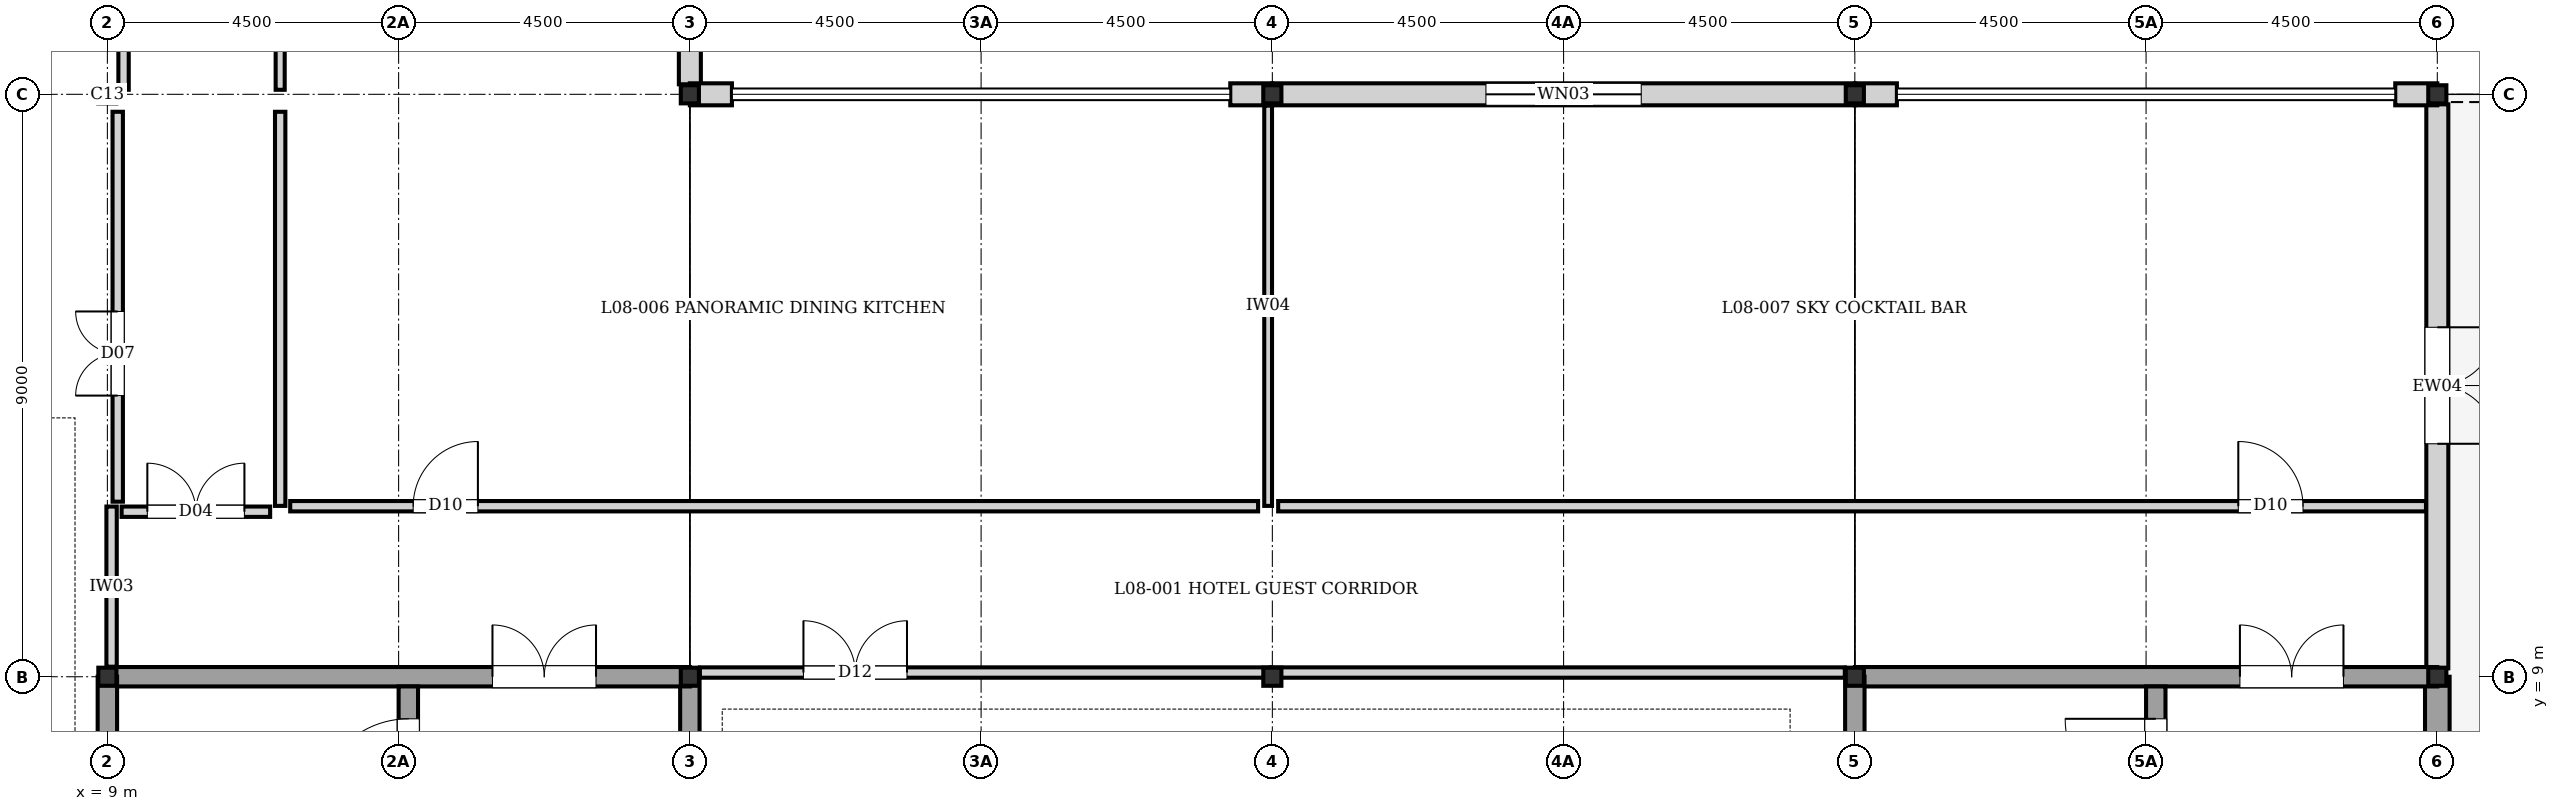
"""IFC4 building model, lengths in metres.
Left out: names, types, materials, properties, quantities, classifications, styles, units other than length and angle.
Written with IfcOpenShell. Run it as: python <this file> out.ifc"""

import sys

from ifc_helpers import new_model, si_unit, direction, frame, frame_2d, origin, origin_2d, place, context, subcontext, project, spatial, rectangle, i_section, extrude, element, fill, save


model = new_model("IFC4")
c1 = context("Model", 3, precision=1e-05, world=origin(), true_north=direction((0.0, 1.0)))
c2 = subcontext(c1, "Body", "Model", "MODEL_VIEW")
j1 = project(units=[si_unit("LENGTHUNIT", "METRE"), si_unit("PLANEANGLEUNIT", "RADIAN")], contexts=[c1])
p1 = place(None, origin())
s1 = spatial("IfcSite", under=j1, at=p1, CompositionType="ELEMENT")
p2 = place(p1, origin())
s2 = spatial("IfcBuilding", under=s1, at=p2, CompositionType="ELEMENT")
p3 = place(p2, frame((0.0, 0.0, 26.88)))
s3 = spatial("IfcBuildingStorey", under=s2, at=p3, CompositionType="ELEMENT", Elevation=26.88)
for number, where, z_axis, x_axis in (
    (1, (9.0, 9.0, 0.0), (0.0, 0.0, 1.0), (1.0, 0.0, 0.0)),
    (2, (9.0, 18.0, 0.0), (0.0, 0.0, 1.0), (1.0, 0.0, 0.0)),
    (3, (18.0, 9.0, 0.0), (0.0, 0.0, 1.0), (1.0, 0.0, 0.0)),
    (4, (18.0, 18.0, 0.0), (0.0, 0.0, 1.0), (1.0, 0.0, 0.0)),
    (5, (27.0, 9.0, 0.0), (0.0, 0.0, 1.0), (1.0, 0.0, 0.0)),
    (6, (27.0, 18.0, 0.0), (0.0, 0.0, 1.0), (1.0, 0.0, 0.0)),
    (7, (36.0, 9.0, 0.0), (0.0, 0.0, 1.0), (1.0, 0.0, 0.0)),
    (8, (36.0, 18.0, 0.0), (0.0, 0.0, 1.0), (1.0, 0.0, 0.0)),
    (9, (45.0, 9.0, 0.0), (0.0, 0.0, 1.0), (1.0, 0.0, 0.0)),
    (10, (45.0, 18.0, 0.0), (0.0, 0.0, 1.0), (1.0, 0.0, 0.0)),
):
    element("IfcColumn", number, at=place(p3, frame(where, z_axis=z_axis, x_axis=x_axis)), inside=s3, PredefinedType="COLUMN", context=c2, shape_type="SweptSolid", body=[
        extrude(i_section(OverallWidth=0.28, OverallDepth=0.28, WebThickness=0.01, FlangeThickness=0.018, at=origin_2d()), origin(), (0.0, 0.0, 1.0), 3.52),
    ])
p4 = place(p3, frame((45.0, 17.845, 0.0), z_axis=(0.0, 0.0, 1.0), x_axis=(0.0, -1.0, 0.0)))
e11 = element("IfcWall", 11, at=p4, inside=s3, PredefinedType="SOLIDWALL", context=c2, shape_type="SweptSolid", body=[
    extrude(rectangle(XDim=8.715, YDim=0.34, at=frame_2d((4.357, 0.0))), origin(), (0.0, 0.0, 1.0), 2.88),
])
p5 = place(p4, frame((3.445, 0.0, 0.0)))
e12 = element("IfcOpeningElement", 12, at=p5, cuts=e11, PredefinedType="OPENING", context=c2, shape_type="SweptSolid", body=[
    extrude(rectangle(XDim=1.8, YDim=2.3, at=frame_2d((0.9, 1.15))), frame((0.0, 0.18, 0.0), z_axis=(0.0, -1.0, 0.0), x_axis=(1.0, 0.0, 0.0)), (0.0, 0.0, 1.0), 0.36),
])
p6 = place(p3, frame((45.0, 9.0, 0.0), z_axis=(0.0, 0.0, 1.0), x_axis=(0.0, -1.0, 0.0)))
e13 = element("IfcWall", 13, at=p6, inside=s3, PredefinedType="SOLIDWALL", context=c2, shape_type="SweptSolid", body=[
    extrude(rectangle(XDim=9.0, YDim=0.38, at=frame_2d((4.5, 0.0))), origin(), (0.0, 0.0, 1.0), 3.27),
])
p7 = place(p3, frame((18.0, 27.0, 0.0), z_axis=(0.0, 0.0, 1.0), x_axis=(0.0, -1.0, 0.0)))
e14 = element("IfcWall", 14, at=p7, inside=s3, PredefinedType="SOLIDWALL", context=c2, shape_type="SweptSolid", body=[
    extrude(rectangle(XDim=8.845, YDim=0.34, at=frame_2d((4.422, 0.0))), origin(), (0.0, 0.0, 1.0), 2.97),
])
p8 = place(p7, frame((4.0, 0.0, 0.4)))
e15 = element("IfcOpeningElement", 15, at=p8, cuts=e14, PredefinedType="OPENING", context=c2, shape_type="SweptSolid", body=[
    extrude(rectangle(XDim=1.0, YDim=1.6, at=frame_2d((0.5, 0.8))), frame((0.0, 0.18, 0.0), z_axis=(0.0, -1.0, 0.0), x_axis=(1.0, 0.0, 0.0)), (0.0, 0.0, 1.0), 0.36),
])
for number, where, z_axis, x_axis in (
    (16, (18.0, 18.0, 0.0), (0.0, 0.0, 1.0), (1.0, 0.0, 0.0)),
    (17, (26.35, 18.0, 0.0), (0.0, 0.0, 1.0), (1.0, 0.0, 0.0)),
):
    element("IfcWall", number, at=place(p3, frame(where, z_axis=z_axis, x_axis=x_axis)), inside=s3, PredefinedType="SOLIDWALL", context=c2, shape_type="SweptSolid", body=[
        extrude(rectangle(XDim=0.65, YDim=0.34, at=frame_2d((0.325, 0.0))), origin(), (0.0, 0.0, 1.0), 3.04),
    ])
p9 = place(p3, frame((27.0, 18.0, 0.0), z_axis=(0.0, 0.0, 1.0), x_axis=(1.0, 0.0, 0.0)))
e18 = element("IfcWall", 18, at=p9, inside=s3, PredefinedType="SOLIDWALL", context=c2, shape_type="SweptSolid", body=[
    extrude(rectangle(XDim=9.0, YDim=0.34, at=frame_2d((4.5, 0.0))), origin(), (0.0, 0.0, 1.0), 2.97),
])
p10 = place(p9, frame((3.3, 0.0, 0.4)))
e19 = element("IfcOpeningElement", 19, at=p10, cuts=e18, PredefinedType="OPENING", context=c2, shape_type="SweptSolid", body=[
    extrude(rectangle(XDim=2.4, YDim=1.95, at=frame_2d((1.2, 0.975))), frame((0.0, 0.18, 0.0), z_axis=(0.0, -1.0, 0.0), x_axis=(1.0, 0.0, 0.0)), (0.0, 0.0, 1.0), 0.36),
])
for number, where, z_axis, x_axis in (
    (20, (36.0, 18.0, 0.0), (0.0, 0.0, 1.0), (1.0, 0.0, 0.0)),
    (21, (44.35, 18.0, 0.0), (0.0, 0.0, 1.0), (1.0, 0.0, 0.0)),
):
    element("IfcWall", number, at=place(p3, frame(where, z_axis=z_axis, x_axis=x_axis)), inside=s3, PredefinedType="SOLIDWALL", context=c2, shape_type="SweptSolid", body=[
        extrude(rectangle(XDim=0.65, YDim=0.34, at=frame_2d((0.325, 0.0))), origin(), (0.0, 0.0, 1.0), 2.91),
    ])
p11 = place(p3, frame((18.0, 0.0, 0.0), z_axis=(0.0, 0.0, 1.0), x_axis=(0.0, 1.0, 0.0)))
e22 = element("IfcWall", 22, at=p11, inside=s3, PredefinedType="SHEAR", context=c2, shape_type="SweptSolid", body=[
    extrude(rectangle(XDim=9.0, YDim=0.3, at=frame_2d((4.5, 0.0))), origin(), (0.0, 0.0, 1.0), 3.27),
])
p12 = place(p3, frame((9.0, 9.0, 0.0), z_axis=(0.0, 0.0, 1.0), x_axis=(1.0, 0.0, 0.0)))
e23 = element("IfcWall", 23, at=p12, inside=s3, PredefinedType="SHEAR", context=c2, shape_type="SweptSolid", body=[
    extrude(rectangle(XDim=9.0, YDim=0.3, at=frame_2d((4.5, 0.0))), origin(), (0.0, 0.0, 1.0), 3.27),
])
p13 = place(p12, frame((5.95, 0.0, 0.0)))
e24 = element("IfcOpeningElement", 24, at=p13, cuts=e23, PredefinedType="OPENING", context=c2, shape_type="SweptSolid", body=[
    extrude(rectangle(XDim=1.6, YDim=2.1, at=frame_2d((0.8, 1.05))), frame((0.0, 0.16, 0.0), z_axis=(0.0, -1.0, 0.0), x_axis=(1.0, 0.0, 0.0)), (0.0, 0.0, 1.0), 0.32),
])
p14 = place(p3, frame((9.0, 0.0, 0.0), z_axis=(0.0, 0.0, 1.0), x_axis=(0.0, 1.0, 0.0)))
e25 = element("IfcWall", 25, at=p14, inside=s3, PredefinedType="SHEAR", context=c2, shape_type="SweptSolid", body=[
    extrude(rectangle(XDim=9.0, YDim=0.3, at=frame_2d((4.5, 0.0))), origin(), (0.0, 0.0, 1.0), 3.27),
])
p15 = place(p3, frame((13.65, 0.15, 0.0), z_axis=(0.0, 0.0, 1.0), x_axis=(0.0, 1.0, 0.0)))
e26 = element("IfcWall", 26, at=p15, inside=s3, PredefinedType="SHEAR", context=c2, shape_type="SweptSolid", body=[
    extrude(rectangle(XDim=8.7, YDim=0.3, at=frame_2d((4.35, 0.0))), origin(), (0.0, 0.0, 1.0), 3.27),
])
p16 = place(p15, frame((6.8, 0.0, 0.0)))
e27 = element("IfcOpeningElement", 27, at=p16, cuts=e26, PredefinedType="OPENING", context=c2, shape_type="SweptSolid", body=[
    extrude(rectangle(XDim=1.4, YDim=2.02, at=frame_2d((0.7, 1.01))), frame((0.0, 0.16, 0.0), z_axis=(0.0, -1.0, 0.0), x_axis=(1.0, 0.0, 0.0)), (0.0, 0.0, 1.0), 0.32),
])
p17 = place(p3, frame((36.0, 9.0, 0.0), z_axis=(0.0, 0.0, 1.0), x_axis=(1.0, 0.0, 0.0)))
e28 = element("IfcWall", 28, at=p17, inside=s3, PredefinedType="SHEAR", context=c2, shape_type="SweptSolid", body=[
    extrude(rectangle(XDim=9.0, YDim=0.3, at=frame_2d((4.5, 0.0))), origin(), (0.0, 0.0, 1.0), 3.27),
])
p18 = place(p17, frame((5.95, 0.0, 0.0)))
e29 = element("IfcOpeningElement", 29, at=p18, cuts=e28, PredefinedType="OPENING", context=c2, shape_type="SweptSolid", body=[
    extrude(rectangle(XDim=1.6, YDim=2.1, at=frame_2d((0.8, 1.05))), frame((0.0, 0.16, 0.0), z_axis=(0.0, -1.0, 0.0), x_axis=(1.0, 0.0, 0.0)), (0.0, 0.0, 1.0), 0.32),
])
p19 = place(p3, frame((36.0, 0.0, 0.0), z_axis=(0.0, 0.0, 1.0), x_axis=(0.0, 1.0, 0.0)))
e30 = element("IfcWall", 30, at=p19, inside=s3, PredefinedType="SHEAR", context=c2, shape_type="SweptSolid", body=[
    extrude(rectangle(XDim=9.0, YDim=0.3, at=frame_2d((4.5, 0.0))), origin(), (0.0, 0.0, 1.0), 3.27),
])
p20 = place(p3, frame((40.65, 0.15, 0.0), z_axis=(0.0, 0.0, 1.0), x_axis=(0.0, 1.0, 0.0)))
e31 = element("IfcWall", 31, at=p20, inside=s3, PredefinedType="SHEAR", context=c2, shape_type="SweptSolid", body=[
    extrude(rectangle(XDim=8.7, YDim=0.3, at=frame_2d((4.35, 0.0))), origin(), (0.0, 0.0, 1.0), 3.27),
])
p21 = place(p20, frame((6.8, 0.0, 0.0)))
e32 = element("IfcOpeningElement", 32, at=p21, cuts=e31, PredefinedType="OPENING", context=c2, shape_type="SweptSolid", body=[
    extrude(rectangle(XDim=1.4, YDim=2.02, at=frame_2d((0.7, 1.01))), frame((0.0, 0.16, 0.0), z_axis=(0.0, -1.0, 0.0), x_axis=(1.0, 0.0, 0.0)), (0.0, 0.0, 1.0), 0.32),
])
p22 = place(p3, frame((9.065, 9.155, 0.0), z_axis=(0.0, 0.0, 1.0), x_axis=(0.0, 1.0, 0.0)))
e33 = element("IfcWall", 33, at=p22, inside=s3, PredefinedType="PARTITIONING", context=c2, shape_type="SweptSolid", body=[
    extrude(rectangle(XDim=2.475, YDim=0.16, at=frame_2d((1.237, 0.0))), origin(), (0.0, 0.0, 1.0), 3.27),
])
p23 = place(p3, frame((11.67, 11.64, 0.0), z_axis=(0.0, 0.0, 1.0), x_axis=(0.0, 1.0, 0.0)))
e34 = element("IfcWall", 34, at=p23, inside=s3, PredefinedType="PARTITIONING", context=c2, shape_type="SweptSolid", body=[
    extrude(rectangle(XDim=6.09, YDim=0.16, at=frame_2d((3.045, 0.0))), origin(), (0.0, 0.0, 1.0), 3.27),
])
p24 = place(p3, frame((26.935, 11.64, 0.0), z_axis=(0.0, 0.0, 1.0), x_axis=(0.0, 1.0, 0.0)))
e35 = element("IfcWall", 35, at=p24, inside=s3, PredefinedType="PARTITIONING", context=c2, shape_type="SweptSolid", body=[
    extrude(rectangle(XDim=6.185, YDim=0.12, at=frame_2d((3.093, 0.0))), origin(), (0.0, 0.0, 1.0), 2.98),
])
p25 = place(p3, frame((9.22, 11.55, 0.0), z_axis=(0.0, 0.0, 1.0), x_axis=(1.0, 0.0, 0.0)))
e36 = element("IfcWall", 36, at=p25, inside=s3, PredefinedType="PARTITIONING", context=c2, shape_type="SweptSolid", body=[
    extrude(rectangle(XDim=2.295, YDim=0.16, at=frame_2d((1.147, 0.0))), origin(), (0.0, 0.0, 1.0), 3.27),
])
p26 = place(p25, frame((0.397, 0.0, 0.0)))
e37 = element("IfcOpeningElement", 37, at=p26, cuts=e36, PredefinedType="OPENING", context=c2, shape_type="SweptSolid", body=[
    extrude(rectangle(XDim=1.5, YDim=2.1, at=frame_2d((0.75, 1.05))), frame((0.0, 0.09, 0.0), z_axis=(0.0, -1.0, 0.0), x_axis=(1.0, 0.0, 0.0)), (0.0, 0.0, 1.0), 0.18),
])
p27 = place(p3, frame((18.155, 9.065, 0.0), z_axis=(0.0, 0.0, 1.0), x_axis=(1.0, 0.0, 0.0)))
e38 = element("IfcWall", 38, at=p27, inside=s3, PredefinedType="PARTITIONING", context=c2, shape_type="SweptSolid", body=[
    extrude(rectangle(XDim=8.825, YDim=0.16, at=frame_2d((4.413, 0.0))), origin(), (0.0, 0.0, 1.0), 2.87),
])
p28 = place(p27, frame((1.6, 0.0, 0.0)))
e39 = element("IfcOpeningElement", 39, at=p28, cuts=e38, PredefinedType="OPENING", context=c2, shape_type="SweptSolid", body=[
    extrude(rectangle(XDim=1.6, YDim=2.3, at=frame_2d((0.8, 1.15))), frame((0.0, 0.09, 0.0), z_axis=(0.0, -1.0, 0.0), x_axis=(1.0, 0.0, 0.0)), (0.0, 0.0, 1.0), 0.18),
])
p29 = place(p3, frame((11.825, 11.635, 0.0), z_axis=(0.0, 0.0, 1.0), x_axis=(1.0, 0.0, 0.0)))
e40 = element("IfcWall", 40, at=p29, inside=s3, PredefinedType="PARTITIONING", context=c2, shape_type="SweptSolid", body=[
    extrude(rectangle(XDim=14.955, YDim=0.16, at=frame_2d((7.478, 0.0))), origin(), (0.0, 0.0, 1.0), 3.27),
])
p30 = place(p29, frame((1.9, 0.0, 0.0)))
e41 = element("IfcOpeningElement", 41, at=p30, cuts=e40, PredefinedType="OPENING", context=c2, shape_type="SweptSolid", body=[
    extrude(rectangle(XDim=1.0, YDim=2.1, at=frame_2d((0.5, 1.05))), frame((0.0, 0.09, 0.0), z_axis=(0.0, -1.0, 0.0), x_axis=(1.0, 0.0, 0.0)), (0.0, 0.0, 1.0), 0.18),
])
p31 = place(p3, frame((27.09, 11.635, 0.0), z_axis=(0.0, 0.0, 1.0), x_axis=(1.0, 0.0, 0.0)))
e42 = element("IfcWall", 42, at=p31, inside=s3, PredefinedType="PARTITIONING", context=c2, shape_type="SweptSolid", body=[
    extrude(rectangle(XDim=17.735, YDim=0.16, at=frame_2d((8.867, 0.0))), origin(), (0.0, 0.0, 1.0), 3.27),
])
p32 = place(p31, frame((14.835, 0.0, 0.0)))
e43 = element("IfcOpeningElement", 43, at=p32, cuts=e42, PredefinedType="OPENING", context=c2, shape_type="SweptSolid", body=[
    extrude(rectangle(XDim=1.0, YDim=2.1, at=frame_2d((0.5, 1.05))), frame((0.0, 0.09, 0.0), z_axis=(0.0, -1.0, 0.0), x_axis=(1.0, 0.0, 0.0)), (0.0, 0.0, 1.0), 0.18),
])
p33 = place(p3, frame((9.16, 11.705, 0.0), z_axis=(0.0, 0.0, 1.0), x_axis=(0.0, 1.0, 0.0)))
e44 = element("IfcWall", 44, at=p33, inside=s3, PredefinedType="PARTITIONING", context=c2, shape_type="SweptSolid", body=[
    extrude(rectangle(XDim=6.025, YDim=0.16, at=frame_2d((3.012, 0.0))), origin(), (0.0, 0.0, 1.0), 3.27),
])
p34 = place(p33, frame((1.639, 0.0, 0.0)))
e45 = element("IfcOpeningElement", 45, at=p34, cuts=e44, PredefinedType="OPENING", context=c2, shape_type="SweptSolid", body=[
    extrude(rectangle(XDim=1.3, YDim=2.25, at=frame_2d((0.65, 1.125))), frame((0.0, 0.09, 0.0), z_axis=(0.0, -1.0, 0.0), x_axis=(1.0, 0.0, 0.0)), (0.0, 0.0, 1.0), 0.18),
])
p35 = place(p3, frame((11.67, 18.07, 0.0), z_axis=(0.0, 0.0, 1.0), x_axis=(0.0, 1.0, 0.0)))
e46 = element("IfcWall", 46, at=p35, inside=s3, PredefinedType="PLUMBINGWALL", context=c2, shape_type="SweptSolid", body=[
    extrude(rectangle(XDim=4.21, YDim=0.14, at=frame_2d((2.105, 0.0))), origin(), (0.0, 0.0, 1.0), 3.27),
])
p36 = place(p35, frame((2.16, 0.0, 0.0)))
e47 = element("IfcOpeningElement", 47, at=p36, cuts=e46, PredefinedType="OPENING", context=c2, shape_type="SweptSolid", body=[
    extrude(rectangle(XDim=0.9, YDim=2.1, at=frame_2d((0.45, 1.05))), frame((0.0, 0.08, 0.0), z_axis=(0.0, -1.0, 0.0), x_axis=(1.0, 0.0, 0.0)), (0.0, 0.0, 1.0), 0.16),
])
p37 = place(p3, frame((9.25, 18.07, 0.0), z_axis=(0.0, 0.0, 1.0), x_axis=(0.0, 1.0, 0.0)))
e48 = element("IfcWall", 48, at=p37, inside=s3, PredefinedType="PARTITIONING", context=c2, shape_type="SweptSolid", body=[
    extrude(rectangle(XDim=4.21, YDim=0.16, at=frame_2d((2.105, 0.0))), origin(), (0.0, 0.0, 1.0), 3.27),
])
p38 = place(p37, frame((2.11, 0.0, 0.0)))
e49 = element("IfcOpeningElement", 49, at=p38, cuts=e48, PredefinedType="OPENING", context=c2, shape_type="SweptSolid", body=[
    extrude(rectangle(XDim=1.0, YDim=2.1, at=frame_2d((0.5, 1.05))), frame((0.0, 0.09, 0.0), z_axis=(0.0, -1.0, 0.0), x_axis=(1.0, 0.0, 0.0)), (0.0, 0.0, 1.0), 0.18),
])
p39 = place(p3, frame((26.98, 9.065, 0.0), z_axis=(0.0, 0.0, 1.0), x_axis=(1.0, 0.0, 0.0)))
e50 = element("IfcWall", 50, at=p39, inside=s3, PredefinedType="PARTITIONING", context=c2, shape_type="SweptSolid", body=[
    extrude(rectangle(XDim=8.865, YDim=0.16, at=frame_2d((4.433, 0.0))), origin(), (0.0, 0.0, 1.0), 3.27),
])
p40 = place(p5, origin())
e51 = element("IfcDoor", 51, at=p40, inside=s3, OperationType="DOUBLE_DOOR_SINGLE_SWING", PredefinedType="DOOR", context=c2, shape_type="SweptSolid", body=[
    extrude(rectangle(XDim=1.8, YDim=2.3, at=frame_2d((0.9, 1.15))), frame((0.0, 0.025, 0.0), z_axis=(0.0, -1.0, 0.0), x_axis=(1.0, 0.0, 0.0)), (0.0, 0.0, 1.0), 0.05),
])
fill(e12, e51)
p41 = place(p10, origin())
e52 = element("IfcWindow", 52, at=p41, inside=s3, PartitioningType="SINGLE_PANEL", PredefinedType="WINDOW", context=c2, shape_type="SweptSolid", body=[
    extrude(rectangle(XDim=2.4, YDim=1.95, at=frame_2d((1.2, 0.975))), frame((0.0, 0.03, 0.0), z_axis=(0.0, -1.0, 0.0), x_axis=(1.0, 0.0, 0.0)), (0.0, 0.0, 1.0), 0.06),
])
fill(e19, e52)
p42 = place(p13, origin())
e53 = element("IfcDoor", 53, at=p42, inside=s3, OperationType="DOUBLE_DOOR_SINGLE_SWING", PredefinedType="DOOR", context=c2, shape_type="SweptSolid", body=[
    extrude(rectangle(XDim=1.6, YDim=2.1, at=frame_2d((0.8, 1.05))), frame((0.0, 0.025, 0.0), z_axis=(0.0, -1.0, 0.0), x_axis=(1.0, 0.0, 0.0)), (0.0, 0.0, 1.0), 0.05),
])
fill(e24, e53)
p43 = place(p16, origin())
e54 = element("IfcDoor", 54, at=p43, inside=s3, OperationType="SINGLE_SWING_LEFT", PredefinedType="DOOR", context=c2, shape_type="SweptSolid", body=[
    extrude(rectangle(XDim=1.4, YDim=2.02, at=frame_2d((0.7, 1.01))), frame((0.0, 0.025, 0.0), z_axis=(0.0, -1.0, 0.0), x_axis=(1.0, 0.0, 0.0)), (0.0, 0.0, 1.0), 0.05),
])
fill(e27, e54)
p44 = place(p18, origin())
e55 = element("IfcDoor", 55, at=p44, inside=s3, OperationType="DOUBLE_DOOR_SINGLE_SWING", PredefinedType="DOOR", context=c2, shape_type="SweptSolid", body=[
    extrude(rectangle(XDim=1.6, YDim=2.1, at=frame_2d((0.8, 1.05))), frame((0.0, 0.025, 0.0), z_axis=(0.0, -1.0, 0.0), x_axis=(1.0, 0.0, 0.0)), (0.0, 0.0, 1.0), 0.05),
])
fill(e29, e55)
p45 = place(p21, origin())
e56 = element("IfcDoor", 56, at=p45, inside=s3, OperationType="SINGLE_SWING_RIGHT", PredefinedType="DOOR", context=c2, shape_type="SweptSolid", body=[
    extrude(rectangle(XDim=1.4, YDim=2.02, at=frame_2d((0.7, 1.01))), frame((0.0, 0.025, 0.0), z_axis=(0.0, -1.0, 0.0), x_axis=(1.0, 0.0, 0.0)), (0.0, 0.0, 1.0), 0.05),
])
fill(e32, e56)
p46 = place(p26, origin())
e57 = element("IfcDoor", 57, at=p46, inside=s3, OperationType="DOUBLE_DOOR_SINGLE_SWING", PredefinedType="DOOR", context=c2, shape_type="SweptSolid", body=[
    extrude(rectangle(XDim=1.5, YDim=2.1, at=frame_2d((0.75, 1.05))), frame((0.0, 0.025, 0.0), z_axis=(0.0, -1.0, 0.0), x_axis=(1.0, 0.0, 0.0)), (0.0, 0.0, 1.0), 0.05),
])
fill(e37, e57)
p47 = place(p28, origin())
e58 = element("IfcDoor", 58, at=p47, inside=s3, OperationType="DOUBLE_DOOR_SINGLE_SWING", PredefinedType="DOOR", context=c2, shape_type="SweptSolid", body=[
    extrude(rectangle(XDim=1.6, YDim=2.3, at=frame_2d((0.8, 1.15))), frame((0.0, 0.025, 0.0), z_axis=(0.0, -1.0, 0.0), x_axis=(1.0, 0.0, 0.0)), (0.0, 0.0, 1.0), 0.05),
])
fill(e39, e58)
p48 = place(p30, origin())
e59 = element("IfcDoor", 59, at=p48, inside=s3, OperationType="SINGLE_SWING_RIGHT", PredefinedType="DOOR", context=c2, shape_type="SweptSolid", body=[
    extrude(rectangle(XDim=1.0, YDim=2.1, at=frame_2d((0.5, 1.05))), frame((0.0, 0.025, 0.0), z_axis=(0.0, -1.0, 0.0), x_axis=(1.0, 0.0, 0.0)), (0.0, 0.0, 1.0), 0.05),
])
fill(e41, e59)
p49 = place(p32, origin())
e60 = element("IfcDoor", 60, at=p49, inside=s3, OperationType="SINGLE_SWING_LEFT", PredefinedType="DOOR", context=c2, shape_type="SweptSolid", body=[
    extrude(rectangle(XDim=1.0, YDim=2.1, at=frame_2d((0.5, 1.05))), frame((0.0, 0.025, 0.0), z_axis=(0.0, -1.0, 0.0), x_axis=(1.0, 0.0, 0.0)), (0.0, 0.0, 1.0), 0.05),
])
fill(e43, e60)
p50 = place(p34, origin())
e61 = element("IfcDoor", 61, at=p50, inside=s3, OperationType="DOUBLE_DOOR_SINGLE_SWING", PredefinedType="DOOR", context=c2, shape_type="SweptSolid", body=[
    extrude(rectangle(XDim=1.3, YDim=2.25, at=frame_2d((0.65, 1.125))), frame((0.0, 0.025, 0.0), z_axis=(0.0, -1.0, 0.0), x_axis=(1.0, 0.0, 0.0)), (0.0, 0.0, 1.0), 0.05),
])
fill(e45, e61)
save(model, sys.argv[1])
